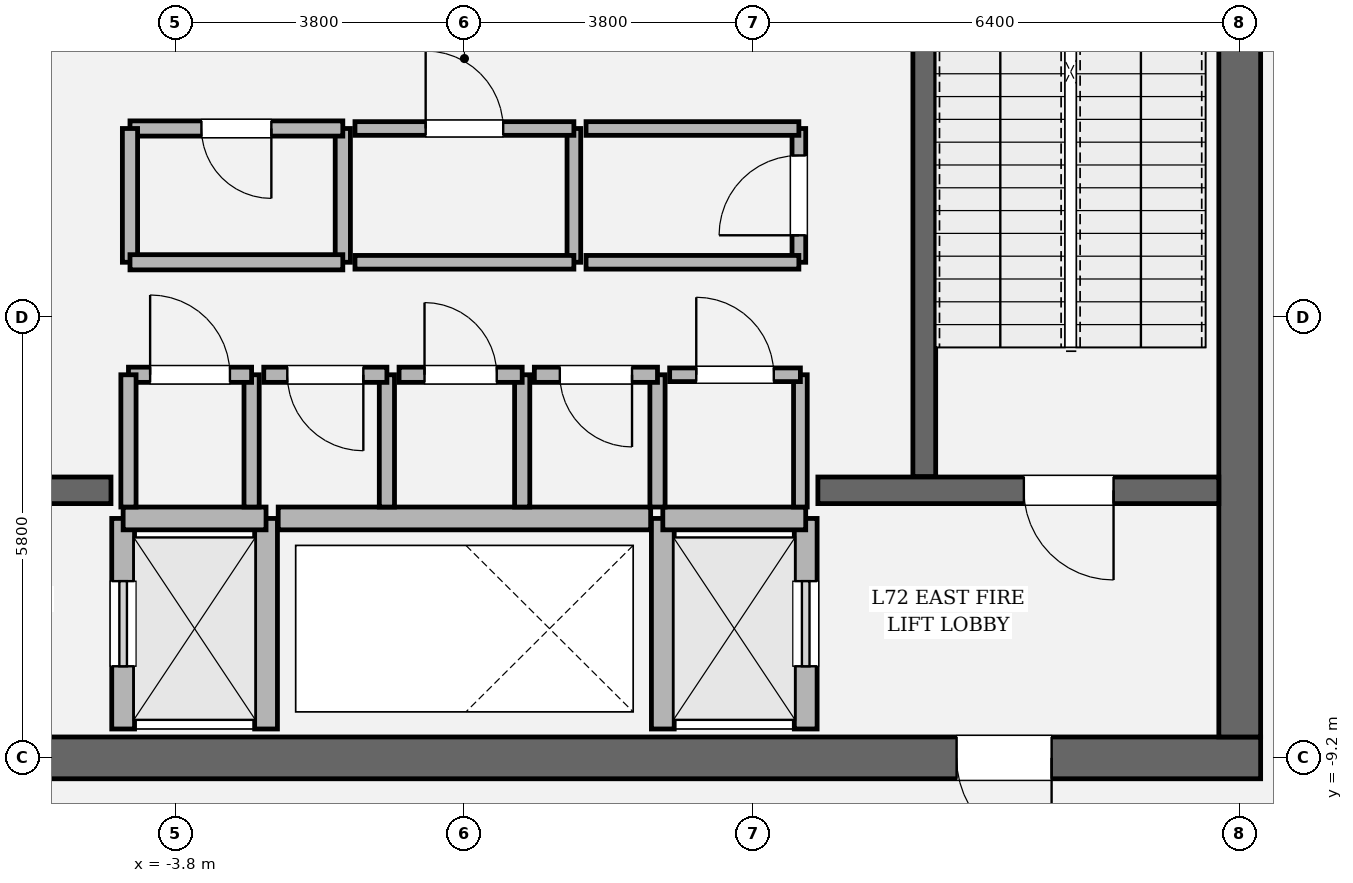
"""IFC4 building model, lengths in metres.
Left out: names, types, materials, properties, quantities, classifications, styles, units other than length and angle.
Written with IfcOpenShell. Run it as: python <this file> out.ifc"""

import sys

from ifc_helpers import new_model, si_unit, direction, frame, frame_2d, origin, place, context, subcontext, project, spatial, rectangle, extrude, element, fill, save


model = new_model("IFC4")
c1 = context("Model", 3, precision=1e-05, world=origin(), true_north=direction((0.0, 1.0)))
c2 = subcontext(c1, "Body", "Model", "MODEL_VIEW")
j1 = project(units=[si_unit("LENGTHUNIT", "METRE"), si_unit("PLANEANGLEUNIT", "RADIAN")], contexts=[c1])
p1 = place(None, origin())
s1 = spatial("IfcSite", under=j1, at=p1, CompositionType="ELEMENT")
p2 = place(p1, origin())
s2 = spatial("IfcBuilding", under=s1, at=p2, CompositionType="ELEMENT")
p3 = place(p2, frame((0.0, 0.0, 304.8)))
s3 = spatial("IfcBuildingStorey", under=s2, at=p3, CompositionType="ELEMENT", Elevation=304.8)
p4 = place(p3, frame((10.475, -9.2, 0.0), z_axis=(0.0, 0.0, 1.0), x_axis=(-1.0, 0.0, 0.0)))
e1 = element("IfcWall", 1, at=p4, inside=s3, PredefinedType="SHEAR", context=c2, shape_type="SweptSolid", body=[
    extrude(rectangle(XDim=20.95, YDim=0.55, at=frame_2d((10.475, 0.0))), origin(), (0.0, 0.0, 1.0), 4.2),
])
p5 = place(p4, frame((2.75, 0.0, 0.0)))
e2 = element("IfcOpeningElement", 2, at=p5, cuts=e1, PredefinedType="OPENING", context=c2, shape_type="SweptSolid", body=[
    extrude(rectangle(XDim=1.25, YDim=2.25, at=frame_2d((0.625, 1.125))), frame((0.0, 0.285, 0.0), z_axis=(0.0, -1.0, 0.0), x_axis=(1.0, 0.0, 0.0)), (0.0, 0.0, 1.0), 0.57),
])
p6 = place(p4, frame((16.95, 0.0, 0.0)))
e3 = element("IfcOpeningElement", 3, at=p6, cuts=e1, PredefinedType="OPENING", context=c2, shape_type="SweptSolid", body=[
    extrude(rectangle(XDim=1.25, YDim=2.25, at=frame_2d((0.625, 1.125))), frame((0.0, 0.285, 0.0), z_axis=(0.0, -1.0, 0.0), x_axis=(1.0, 0.0, 0.0)), (0.0, 0.0, 1.0), 0.57),
])
p7 = place(p3, frame((10.2, 8.925, 0.0), z_axis=(0.0, 0.0, 1.0), x_axis=(0.0, -1.0, 0.0)))
e4 = element("IfcWall", 4, at=p7, inside=s3, PredefinedType="SHEAR", context=c2, shape_type="SweptSolid", body=[
    extrude(rectangle(XDim=17.85, YDim=0.55, at=frame_2d((8.925, 0.0))), origin(), (0.0, 0.0, 1.0), 4.2),
])
p8 = place(p7, frame((3.955, 0.0, 0.0)))
e5 = element("IfcOpeningElement", 5, at=p8, cuts=e4, PredefinedType="OPENING", context=c2, shape_type="SweptSolid", body=[
    extrude(rectangle(XDim=1.18, YDim=2.2, at=frame_2d((0.59, 1.1))), frame((0.0, 0.285, 0.0), z_axis=(0.0, -1.0, 0.0), x_axis=(1.0, 0.0, 0.0)), (0.0, 0.0, 1.0), 0.57),
])
p9 = place(p3, frame((6.05, 3.45, 0.0), z_axis=(0.0, 0.0, 1.0), x_axis=(0.0, -1.0, 0.0)))
e6 = element("IfcWall", 6, at=p9, inside=s3, PredefinedType="SOLIDWALL", context=c2, shape_type="SweptSolid", body=[
    extrude(rectangle(XDim=8.95, YDim=0.3, at=frame_2d((4.475, 0.0))), origin(), (0.0, 0.0, 1.0), 4.2),
])
p10 = place(p3, frame((-9.925, -5.68, 0.0), z_axis=(0.0, 0.0, 1.0), x_axis=(1.0, 0.0, 0.0)))
e7 = element("IfcWall", 7, at=p10, inside=s3, PredefinedType="SOLIDWALL", context=c2, shape_type="SweptSolid", body=[
    extrude(rectangle(XDim=5.275, YDim=0.35, at=frame_2d((2.638, 0.0))), origin(), (0.0, 0.0, 1.0), 4.2),
])
p11 = place(p10, frame((1.385, 0.0, 0.0)))
e8 = element("IfcOpeningElement", 8, at=p11, cuts=e7, PredefinedType="OPENING", context=c2, shape_type="SweptSolid", body=[
    extrude(rectangle(XDim=1.18, YDim=2.2, at=frame_2d((0.59, 1.1))), frame((0.0, 0.185, 0.0), z_axis=(0.0, -1.0, 0.0), x_axis=(1.0, 0.0, 0.0)), (0.0, 0.0, 1.0), 0.37),
])
p12 = place(p3, frame((4.65, -5.68, 0.0), z_axis=(0.0, 0.0, 1.0), x_axis=(1.0, 0.0, 0.0)))
e9 = element("IfcWall", 9, at=p12, inside=s3, PredefinedType="SOLIDWALL", context=c2, shape_type="SweptSolid", body=[
    extrude(rectangle(XDim=5.275, YDim=0.35, at=frame_2d((2.638, 0.0))), origin(), (0.0, 0.0, 1.0), 4.2),
])
p13 = place(p12, frame((2.71, 0.0, 0.0)))
e10 = element("IfcOpeningElement", 10, at=p13, cuts=e9, PredefinedType="OPENING", context=c2, shape_type="SweptSolid", body=[
    extrude(rectangle(XDim=1.18, YDim=2.2, at=frame_2d((0.59, 1.1))), frame((0.0, 0.185, 0.0), z_axis=(0.0, -1.0, 0.0), x_axis=(1.0, 0.0, 0.0)), (0.0, 0.0, 1.0), 0.37),
])
p14 = place(p3, frame((-4.49, -8.82, 0.0), z_axis=(0.0, 0.0, 1.0), x_axis=(0.0, 1.0, 0.0)))
e11 = element("IfcWall", 11, at=p14, inside=s3, PredefinedType="SOLIDWALL", context=c2, shape_type="SweptSolid", body=[
    extrude(rectangle(XDim=2.77, YDim=0.3, at=frame_2d((1.385, 0.0))), origin(), (0.0, 0.0, 1.0), 4.0),
])
p15 = place(p14, frame((0.825, 0.0, 0.0)))
e12 = element("IfcOpeningElement", 12, at=p15, cuts=e11, PredefinedType="OPENING", context=c2, shape_type="SweptSolid", body=[
    extrude(rectangle(XDim=1.12, YDim=2.25, at=frame_2d((0.56, 1.125))), frame((0.0, 0.16, 0.0), z_axis=(0.0, -1.0, 0.0), x_axis=(1.0, 0.0, 0.0)), (0.0, 0.0, 1.0), 0.32),
])
p16 = place(p3, frame((-2.61, -8.82, 0.0), z_axis=(0.0, 0.0, 1.0), x_axis=(0.0, 1.0, 0.0)))
e13 = element("IfcWall", 13, at=p16, inside=s3, PredefinedType="SOLIDWALL", context=c2, shape_type="SweptSolid", body=[
    extrude(rectangle(XDim=2.77, YDim=0.3, at=frame_2d((1.385, 0.0))), origin(), (0.0, 0.0, 1.0), 4.0),
])
p17 = place(p3, frame((-4.49, -6.05, 0.0), z_axis=(0.0, 0.0, 1.0), x_axis=(1.0, 0.0, 0.0)))
e14 = element("IfcWall", 14, at=p17, inside=s3, PredefinedType="SOLIDWALL", context=c2, shape_type="SweptSolid", body=[
    extrude(rectangle(XDim=1.88, YDim=0.3, at=frame_2d((0.94, 0.0))), origin(), (0.0, 0.0, 1.0), 4.0),
])
p18 = place(p3, frame((4.49, -8.82, 0.0), z_axis=(0.0, 0.0, 1.0), x_axis=(0.0, 1.0, 0.0)))
e15 = element("IfcWall", 15, at=p18, inside=s3, PredefinedType="SOLIDWALL", context=c2, shape_type="SweptSolid", body=[
    extrude(rectangle(XDim=2.77, YDim=0.3, at=frame_2d((1.385, 0.0))), origin(), (0.0, 0.0, 1.0), 4.0),
])
p19 = place(p18, frame((0.825, 0.0, 0.0)))
e16 = element("IfcOpeningElement", 16, at=p19, cuts=e15, PredefinedType="OPENING", context=c2, shape_type="SweptSolid", body=[
    extrude(rectangle(XDim=1.12, YDim=2.25, at=frame_2d((0.56, 1.125))), frame((0.0, 0.16, 0.0), z_axis=(0.0, -1.0, 0.0), x_axis=(1.0, 0.0, 0.0)), (0.0, 0.0, 1.0), 0.32),
])
p20 = place(p3, frame((2.61, -8.82, 0.0), z_axis=(0.0, 0.0, 1.0), x_axis=(0.0, 1.0, 0.0)))
e17 = element("IfcWall", 17, at=p20, inside=s3, PredefinedType="SOLIDWALL", context=c2, shape_type="SweptSolid", body=[
    extrude(rectangle(XDim=2.77, YDim=0.3, at=frame_2d((1.385, 0.0))), origin(), (0.0, 0.0, 1.0), 4.0),
])
p21 = place(p3, frame((2.61, -6.05, 0.0), z_axis=(0.0, 0.0, 1.0), x_axis=(1.0, 0.0, 0.0)))
e18 = element("IfcWall", 18, at=p21, inside=s3, PredefinedType="SOLIDWALL", context=c2, shape_type="SweptSolid", body=[
    extrude(rectangle(XDim=1.88, YDim=0.3, at=frame_2d((0.94, 0.0))), origin(), (0.0, 0.0, 1.0), 4.0),
])
p22 = place(p3, frame((-2.45, -6.05, 0.0), z_axis=(0.0, 0.0, 1.0), x_axis=(1.0, 0.0, 0.0)))
e19 = element("IfcWall", 19, at=p22, inside=s3, PredefinedType="SOLIDWALL", context=c2, shape_type="SweptSolid", body=[
    extrude(rectangle(XDim=4.9, YDim=0.3, at=frame_2d((2.45, 0.0))), origin(), (0.0, 0.0, 1.0), 4.0),
])
p23 = place(p3, frame((-2.8, -5.9, 0.0), z_axis=(0.0, 0.0, 1.0), x_axis=(0.0, 1.0, 0.0)))
e20 = element("IfcWall", 20, at=p23, inside=s3, PredefinedType="SOLIDWALL", context=c2, shape_type="SweptSolid", body=[
    extrude(rectangle(XDim=1.74, YDim=0.2, at=frame_2d((0.87, 0.0))), origin(), (0.0, 0.0, 1.0), 4.0),
])
p24 = place(p3, frame((-2.8, -4.16, 0.0), z_axis=(0.0, 0.0, 1.0), x_axis=(-1.0, 0.0, 0.0)))
e21 = element("IfcWall", 21, at=p24, inside=s3, PredefinedType="SOLIDWALL", context=c2, shape_type="SweptSolid", body=[
    extrude(rectangle(XDim=1.62, YDim=0.2, at=frame_2d((0.81, 0.0))), origin(), (0.0, 0.0, 1.0), 4.0),
])
p25 = place(p24, frame((0.285, 0.0, 0.0)))
e22 = element("IfcOpeningElement", 22, at=p25, cuts=e21, PredefinedType="OPENING", context=c2, shape_type="SweptSolid", body=[
    extrude(rectangle(XDim=1.05, YDim=2.2, at=frame_2d((0.525, 1.1))), frame((0.0, 0.11, 0.0), z_axis=(0.0, -1.0, 0.0), x_axis=(1.0, 0.0, 0.0)), (0.0, 0.0, 1.0), 0.22),
])
for number, where, z_axis, x_axis in (
    (23, (-4.42, -4.16, 0.0), (0.0, 0.0, 1.0), (0.0, -1.0, 0.0)),
    (24, (-1.02, -5.9, 0.0), (0.0, 0.0, 1.0), (0.0, 1.0, 0.0)),
):
    element("IfcWall", number, at=place(p3, frame(where, z_axis=z_axis, x_axis=x_axis)), inside=s3, PredefinedType="SOLIDWALL", context=c2, shape_type="SweptSolid", body=[
        extrude(rectangle(XDim=1.74, YDim=0.2, at=frame_2d((0.87, 0.0))), origin(), (0.0, 0.0, 1.0), 4.0),
    ])
p26 = place(p3, frame((-1.02, -4.16, 0.0), z_axis=(0.0, 0.0, 1.0), x_axis=(-1.0, 0.0, 0.0)))
e25 = element("IfcWall", 25, at=p26, inside=s3, PredefinedType="SOLIDWALL", context=c2, shape_type="SweptSolid", body=[
    extrude(rectangle(XDim=1.62, YDim=0.2, at=frame_2d((0.81, 0.0))), origin(), (0.0, 0.0, 1.0), 4.0),
])
p27 = place(p26, frame((0.31, 0.0, 0.0)))
e26 = element("IfcOpeningElement", 26, at=p27, cuts=e25, PredefinedType="OPENING", context=c2, shape_type="SweptSolid", body=[
    extrude(rectangle(XDim=1.0, YDim=2.15, at=frame_2d((0.5, 1.075))), frame((0.0, 0.11, 0.0), z_axis=(0.0, -1.0, 0.0), x_axis=(1.0, 0.0, 0.0)), (0.0, 0.0, 1.0), 0.22),
])
p28 = place(p3, frame((0.76, -5.9, 0.0), z_axis=(0.0, 0.0, 1.0), x_axis=(0.0, 1.0, 0.0)))
e27 = element("IfcWall", 27, at=p28, inside=s3, PredefinedType="SOLIDWALL", context=c2, shape_type="SweptSolid", body=[
    extrude(rectangle(XDim=1.74, YDim=0.2, at=frame_2d((0.87, 0.0))), origin(), (0.0, 0.0, 1.0), 4.0),
])
p29 = place(p3, frame((0.76, -4.16, 0.0), z_axis=(0.0, 0.0, 1.0), x_axis=(-1.0, 0.0, 0.0)))
e28 = element("IfcWall", 28, at=p29, inside=s3, PredefinedType="SOLIDWALL", context=c2, shape_type="SweptSolid", body=[
    extrude(rectangle(XDim=1.62, YDim=0.2, at=frame_2d((0.81, 0.0))), origin(), (0.0, 0.0, 1.0), 4.0),
])
p30 = place(p29, frame((0.335, 0.0, 0.0)))
e29 = element("IfcOpeningElement", 29, at=p30, cuts=e28, PredefinedType="OPENING", context=c2, shape_type="SweptSolid", body=[
    extrude(rectangle(XDim=0.95, YDim=2.15, at=frame_2d((0.475, 1.075))), frame((0.0, 0.11, 0.0), z_axis=(0.0, -1.0, 0.0), x_axis=(1.0, 0.0, 0.0)), (0.0, 0.0, 1.0), 0.22),
])
p31 = place(p3, frame((2.54, -5.9, 0.0), z_axis=(0.0, 0.0, 1.0), x_axis=(0.0, 1.0, 0.0)))
e30 = element("IfcWall", 30, at=p31, inside=s3, PredefinedType="SOLIDWALL", context=c2, shape_type="SweptSolid", body=[
    extrude(rectangle(XDim=1.74, YDim=0.2, at=frame_2d((0.87, 0.0))), origin(), (0.0, 0.0, 1.0), 4.0),
])
p32 = place(p3, frame((2.54, -4.16, 0.0), z_axis=(0.0, 0.0, 1.0), x_axis=(-1.0, 0.0, 0.0)))
e31 = element("IfcWall", 31, at=p32, inside=s3, PredefinedType="SOLIDWALL", context=c2, shape_type="SweptSolid", body=[
    extrude(rectangle(XDim=1.62, YDim=0.2, at=frame_2d((0.81, 0.0))), origin(), (0.0, 0.0, 1.0), 4.0),
])
p33 = place(p32, frame((0.335, 0.0, 0.0)))
e32 = element("IfcOpeningElement", 32, at=p33, cuts=e31, PredefinedType="OPENING", context=c2, shape_type="SweptSolid", body=[
    extrude(rectangle(XDim=0.95, YDim=2.15, at=frame_2d((0.475, 1.075))), frame((0.0, 0.11, 0.0), z_axis=(0.0, -1.0, 0.0), x_axis=(1.0, 0.0, 0.0)), (0.0, 0.0, 1.0), 0.22),
])
p34 = place(p3, frame((4.42, -5.9, 0.0), z_axis=(0.0, 0.0, 1.0), x_axis=(0.0, 1.0, 0.0)))
e33 = element("IfcWall", 33, at=p34, inside=s3, PredefinedType="PARTITIONING", context=c2, shape_type="SweptSolid", body=[
    extrude(rectangle(XDim=1.74, YDim=0.18, at=frame_2d((0.87, 0.0))), origin(), (0.0, 0.0, 1.0), 4.0),
])
p35 = place(p3, frame((4.42, -4.16, 0.0), z_axis=(0.0, 0.0, 1.0), x_axis=(-1.0, 0.0, 0.0)))
e34 = element("IfcWall", 34, at=p35, inside=s3, PredefinedType="PARTITIONING", context=c2, shape_type="SweptSolid", body=[
    extrude(rectangle(XDim=1.72, YDim=0.18, at=frame_2d((0.86, 0.0))), origin(), (0.0, 0.0, 1.0), 4.0),
])
p36 = place(p35, frame((0.35, 0.0, 0.0)))
e35 = element("IfcOpeningElement", 35, at=p36, cuts=e34, PredefinedType="OPENING", context=c2, shape_type="SweptSolid", body=[
    extrude(rectangle(XDim=1.02, YDim=2.2, at=frame_2d((0.51, 1.1))), frame((0.0, 0.1, 0.0), z_axis=(0.0, -1.0, 0.0), x_axis=(1.0, 0.0, 0.0)), (0.0, 0.0, 1.0), 0.2),
])
p37 = place(p3, frame((-1.6, -2.68, 0.0), z_axis=(0.0, 0.0, 1.0), x_axis=(0.0, 1.0, 0.0)))
e36 = element("IfcWall", 36, at=p37, inside=s3, PredefinedType="SOLIDWALL", context=c2, shape_type="SweptSolid", body=[
    extrude(rectangle(XDim=1.76, YDim=0.2, at=frame_2d((0.88, 0.0))), origin(), (0.0, 0.0, 1.0), 4.0),
])
p38 = place(p3, frame((-1.6, -0.92, 0.0), z_axis=(0.0, 0.0, 1.0), x_axis=(-1.0, 0.0, 0.0)))
e37 = element("IfcWall", 37, at=p38, inside=s3, PredefinedType="SOLIDWALL", context=c2, shape_type="SweptSolid", body=[
    extrude(rectangle(XDim=2.8, YDim=0.2, at=frame_2d((1.4, 0.0))), origin(), (0.0, 0.0, 1.0), 4.0),
])
p39 = place(p38, frame((0.94, 0.0, 0.0)))
e38 = element("IfcOpeningElement", 38, at=p39, cuts=e37, PredefinedType="OPENING", context=c2, shape_type="SweptSolid", body=[
    extrude(rectangle(XDim=0.92, YDim=2.1, at=frame_2d((0.46, 1.05))), frame((0.0, 0.11, 0.0), z_axis=(0.0, -1.0, 0.0), x_axis=(1.0, 0.0, 0.0)), (0.0, 0.0, 1.0), 0.22),
])
p40 = place(p3, frame((-4.4, -0.92, 0.0), z_axis=(0.0, 0.0, 1.0), x_axis=(0.0, -1.0, 0.0)))
e39 = element("IfcWall", 39, at=p40, inside=s3, PredefinedType="SOLIDWALL", context=c2, shape_type="SweptSolid", body=[
    extrude(rectangle(XDim=1.76, YDim=0.2, at=frame_2d((0.88, 0.0))), origin(), (0.0, 0.0, 1.0), 4.0),
])
p41 = place(p3, frame((-4.4, -2.68, 0.0), z_axis=(0.0, 0.0, 1.0), x_axis=(1.0, 0.0, 0.0)))
e40 = element("IfcWall", 40, at=p41, inside=s3, PredefinedType="SOLIDWALL", context=c2, shape_type="SweptSolid", body=[
    extrude(rectangle(XDim=2.8, YDim=0.2, at=frame_2d((1.4, 0.0))), origin(), (0.0, 0.0, 1.0), 4.0),
])
p42 = place(p3, frame((1.44, -2.68, 0.0), z_axis=(0.0, 0.0, 1.0), x_axis=(0.0, 1.0, 0.0)))
e41 = element("IfcWall", 41, at=p42, inside=s3, PredefinedType="PARTITIONING", context=c2, shape_type="SweptSolid", body=[
    extrude(rectangle(XDim=1.76, YDim=0.18, at=frame_2d((0.88, 0.0))), origin(), (0.0, 0.0, 1.0), 4.0),
])
p43 = place(p3, frame((1.44, -0.92, 0.0), z_axis=(0.0, 0.0, 1.0), x_axis=(-1.0, 0.0, 0.0)))
e42 = element("IfcWall", 42, at=p43, inside=s3, PredefinedType="PARTITIONING", context=c2, shape_type="SweptSolid", body=[
    extrude(rectangle(XDim=2.88, YDim=0.18, at=frame_2d((1.44, 0.0))), origin(), (0.0, 0.0, 1.0), 4.0),
])
p44 = place(p43, frame((0.93, 0.0, 0.0)))
e43 = element("IfcOpeningElement", 43, at=p44, cuts=e42, PredefinedType="OPENING", context=c2, shape_type="SweptSolid", body=[
    extrude(rectangle(XDim=1.02, YDim=2.2, at=frame_2d((0.51, 1.1))), frame((0.0, 0.1, 0.0), z_axis=(0.0, -1.0, 0.0), x_axis=(1.0, 0.0, 0.0)), (0.0, 0.0, 1.0), 0.2),
])
p45 = place(p3, frame((-1.44, -2.68, 0.0), z_axis=(0.0, 0.0, 1.0), x_axis=(1.0, 0.0, 0.0)))
e44 = element("IfcWall", 44, at=p45, inside=s3, PredefinedType="PARTITIONING", context=c2, shape_type="SweptSolid", body=[
    extrude(rectangle(XDim=2.88, YDim=0.18, at=frame_2d((1.44, 0.0))), origin(), (0.0, 0.0, 1.0), 4.0),
])
p46 = place(p3, frame((4.4, -2.68, 0.0), z_axis=(0.0, 0.0, 1.0), x_axis=(0.0, 1.0, 0.0)))
e45 = element("IfcWall", 45, at=p46, inside=s3, PredefinedType="PARTITIONING", context=c2, shape_type="SweptSolid", body=[
    extrude(rectangle(XDim=1.76, YDim=0.18, at=frame_2d((0.88, 0.0))), origin(), (0.0, 0.0, 1.0), 4.0),
])
p47 = place(p46, frame((0.355, 0.0, 0.0)))
e46 = element("IfcOpeningElement", 46, at=p47, cuts=e45, PredefinedType="OPENING", context=c2, shape_type="SweptSolid", body=[
    extrude(rectangle(XDim=1.05, YDim=2.2, at=frame_2d((0.525, 1.1))), frame((0.0, 0.1, 0.0), z_axis=(0.0, -1.0, 0.0), x_axis=(1.0, 0.0, 0.0)), (0.0, 0.0, 1.0), 0.2),
])
for number, where, z_axis, x_axis in (
    (47, (4.4, -0.92, 0.0), (0.0, 0.0, 1.0), (-1.0, 0.0, 0.0)),
    (48, (1.6, -2.68, 0.0), (0.0, 0.0, 1.0), (1.0, 0.0, 0.0)),
):
    element("IfcWall", number, at=place(p3, frame(where, z_axis=z_axis, x_axis=x_axis)), inside=s3, PredefinedType="PARTITIONING", context=c2, shape_type="SweptSolid", body=[
        extrude(rectangle(XDim=2.8, YDim=0.18, at=frame_2d((1.4, 0.0))), origin(), (0.0, 0.0, 1.0), 4.0),
    ])
p48 = place(p13, origin())
e49 = element("IfcDoor", 49, at=p48, inside=s3, OperationType="SINGLE_SWING_RIGHT", PredefinedType="DOOR", context=c2, shape_type="SweptSolid", body=[
    extrude(rectangle(XDim=1.18, YDim=2.2, at=frame_2d((0.59, 1.1))), frame((0.0, 0.025, 0.0), z_axis=(0.0, -1.0, 0.0), x_axis=(1.0, 0.0, 0.0)), (0.0, 0.0, 1.0), 0.05),
])
fill(e10, e49)
p49 = place(p5, origin())
e50 = element("IfcDoor", 50, at=p49, inside=s3, OperationType="SINGLE_SWING_LEFT", PredefinedType="DOOR", context=c2, shape_type="SweptSolid", body=[
    extrude(rectangle(XDim=1.25, YDim=2.25, at=frame_2d((0.625, 1.125))), frame((0.0, 0.025, 0.0), z_axis=(0.0, -1.0, 0.0), x_axis=(1.0, 0.0, 0.0)), (0.0, 0.0, 1.0), 0.05),
])
fill(e2, e50)
p50 = place(p15, origin())
e51 = element("IfcDoor", 51, at=p50, inside=s3, OperationType="SLIDING_TO_LEFT", PredefinedType="DOOR", context=c2, shape_type="SweptSolid", body=[
    extrude(rectangle(XDim=1.12, YDim=2.25, at=frame_2d((0.56, 1.125))), frame((0.0, 0.025, 0.0), z_axis=(0.0, -1.0, 0.0), x_axis=(1.0, 0.0, 0.0)), (0.0, 0.0, 1.0), 0.05),
])
fill(e12, e51)
p51 = place(p19, origin())
e52 = element("IfcDoor", 52, at=p51, inside=s3, OperationType="SLIDING_TO_RIGHT", PredefinedType="DOOR", context=c2, shape_type="SweptSolid", body=[
    extrude(rectangle(XDim=1.12, YDim=2.25, at=frame_2d((0.56, 1.125))), frame((0.0, 0.025, 0.0), z_axis=(0.0, -1.0, 0.0), x_axis=(1.0, 0.0, 0.0)), (0.0, 0.0, 1.0), 0.05),
])
fill(e16, e52)
p52 = place(p25, origin())
e53 = element("IfcDoor", 53, at=p52, inside=s3, OperationType="SINGLE_SWING_RIGHT", PredefinedType="DOOR", context=c2, shape_type="SweptSolid", body=[
    extrude(rectangle(XDim=1.05, YDim=2.2, at=frame_2d((0.525, 1.1))), frame((0.0, 0.025, 0.0), z_axis=(0.0, -1.0, 0.0), x_axis=(1.0, 0.0, 0.0)), (0.0, 0.0, 1.0), 0.05),
])
fill(e22, e53)
p53 = place(p27, origin())
e54 = element("IfcDoor", 54, at=p53, inside=s3, OperationType="SINGLE_SWING_LEFT", PredefinedType="DOOR", context=c2, shape_type="SweptSolid", body=[
    extrude(rectangle(XDim=1.0, YDim=2.15, at=frame_2d((0.5, 1.075))), frame((0.0, 0.025, 0.0), z_axis=(0.0, -1.0, 0.0), x_axis=(1.0, 0.0, 0.0)), (0.0, 0.0, 1.0), 0.05),
])
fill(e26, e54)
p54 = place(p30, origin())
e55 = element("IfcDoor", 55, at=p54, inside=s3, OperationType="SINGLE_SWING_RIGHT", PredefinedType="DOOR", context=c2, shape_type="SweptSolid", body=[
    extrude(rectangle(XDim=0.95, YDim=2.15, at=frame_2d((0.475, 1.075))), frame((0.0, 0.025, 0.0), z_axis=(0.0, -1.0, 0.0), x_axis=(1.0, 0.0, 0.0)), (0.0, 0.0, 1.0), 0.05),
])
fill(e29, e55)
p55 = place(p33, origin())
e56 = element("IfcDoor", 56, at=p55, inside=s3, OperationType="SINGLE_SWING_LEFT", PredefinedType="DOOR", context=c2, shape_type="SweptSolid", body=[
    extrude(rectangle(XDim=0.95, YDim=2.15, at=frame_2d((0.475, 1.075))), frame((0.0, 0.025, 0.0), z_axis=(0.0, -1.0, 0.0), x_axis=(1.0, 0.0, 0.0)), (0.0, 0.0, 1.0), 0.05),
])
fill(e32, e56)
p56 = place(p36, origin())
e57 = element("IfcDoor", 57, at=p56, inside=s3, OperationType="SINGLE_SWING_RIGHT", PredefinedType="DOOR", context=c2, shape_type="SweptSolid", body=[
    extrude(rectangle(XDim=1.02, YDim=2.2, at=frame_2d((0.51, 1.1))), frame((0.0, 0.025, 0.0), z_axis=(0.0, -1.0, 0.0), x_axis=(1.0, 0.0, 0.0)), (0.0, 0.0, 1.0), 0.05),
])
fill(e35, e57)
p57 = place(p39, origin())
e58 = element("IfcDoor", 58, at=p57, inside=s3, OperationType="SINGLE_SWING_LEFT", PredefinedType="DOOR", context=c2, shape_type="SweptSolid", body=[
    extrude(rectangle(XDim=0.92, YDim=2.1, at=frame_2d((0.46, 1.05))), frame((0.0, 0.025, 0.0), z_axis=(0.0, -1.0, 0.0), x_axis=(1.0, 0.0, 0.0)), (0.0, 0.0, 1.0), 0.05),
])
fill(e38, e58)
p58 = place(p44, origin())
e59 = element("IfcDoor", 59, at=p58, inside=s3, OperationType="SINGLE_SWING_RIGHT", PredefinedType="DOOR", context=c2, shape_type="SweptSolid", body=[
    extrude(rectangle(XDim=1.02, YDim=2.2, at=frame_2d((0.51, 1.1))), frame((0.0, 0.025, 0.0), z_axis=(0.0, -1.0, 0.0), x_axis=(1.0, 0.0, 0.0)), (0.0, 0.0, 1.0), 0.05),
])
fill(e43, e59)
p59 = place(p47, origin())
e60 = element("IfcDoor", 60, at=p59, inside=s3, OperationType="SINGLE_SWING_LEFT", PredefinedType="DOOR", context=c2, shape_type="SweptSolid", body=[
    extrude(rectangle(XDim=1.05, YDim=2.2, at=frame_2d((0.525, 1.1))), frame((0.0, 0.025, 0.0), z_axis=(0.0, -1.0, 0.0), x_axis=(1.0, 0.0, 0.0)), (0.0, 0.0, 1.0), 0.05),
])
fill(e46, e60)
save(model, sys.argv[1])
